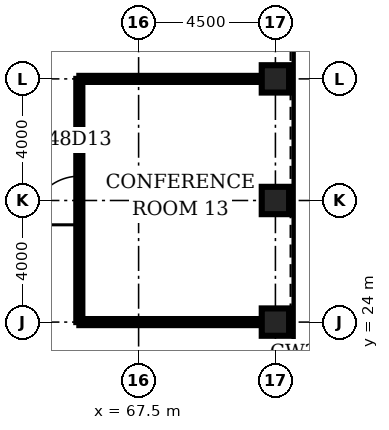
"""IFC4 building model, lengths in metres.
Left out: names, types, materials, properties, quantities, classifications, styles, units other than length and angle.
Written with IfcOpenShell. Run it as: python <this file> out.ifc"""

import sys

from ifc_helpers import new_model, si_unit, direction, frame, frame_2d, origin, origin_2d, place, context, subcontext, project, spatial, rectangle, hollow_rectangle, extrude, element, fill, save


model = new_model("IFC4")
c1 = context("Model", 3, precision=1e-05, world=origin(), true_north=direction((0.0, 1.0)))
c2 = subcontext(c1, "Body", "Model", "MODEL_VIEW")
j1 = project(units=[si_unit("LENGTHUNIT", "METRE"), si_unit("PLANEANGLEUNIT", "RADIAN")], contexts=[c1])
p1 = place(None, origin())
s1 = spatial("IfcSite", under=j1, at=p1, CompositionType="ELEMENT")
p2 = place(p1, origin())
s2 = spatial("IfcBuilding", under=s1, at=p2, CompositionType="ELEMENT")
p3 = place(p2, frame((0.0, 0.0, 215.2)))
s3 = spatial("IfcBuildingStorey", under=s2, at=p3, CompositionType="ELEMENT", Elevation=215.2)
for number, where, z_axis, x_axis in (
    (1, (72.0, 24.0, 0.0), (0.0, 0.0, 1.0), (1.0, 0.0, 0.0)),
    (2, (72.0, 28.0, 0.0), (0.0, 0.0, 1.0), (1.0, 0.0, 0.0)),
    (3, (72.0, 32.0, 0.0), (0.0, 0.0, 1.0), (1.0, 0.0, 0.0)),
):
    element("IfcColumn", number, at=place(p3, frame(where, z_axis=z_axis, x_axis=x_axis)), inside=s3, PredefinedType="COLUMN", context=c2, shape_type="SweptSolid", body=[
        extrude(hollow_rectangle(XDim=0.9, YDim=0.9, WallThickness=0.08, at=origin_2d()), origin(), (0.0, 0.0, 1.0), 4.2),
    ])
for number, where, z_axis, x_axis in (
    (4, (65.55, 24.0, 0.0), (0.0, 0.0, 1.0), (1.0, 0.0, 0.0)),
    (5, (65.55, 32.0, 0.0), (0.0, 0.0, 1.0), (1.0, 0.0, 0.0)),
):
    element("IfcWall", number, at=place(p3, frame(where, z_axis=z_axis, x_axis=x_axis)), inside=s3, PredefinedType="PARTITIONING", context=c2, shape_type="SweptSolid", body=[
        extrude(rectangle(XDim=6.0, YDim=0.2, at=frame_2d((3.0, 0.0))), origin(), (0.0, 0.0, 1.0), 3.0),
    ])
p4 = place(p3, frame((65.55, 24.0, 0.0), z_axis=(0.0, 0.0, 1.0), x_axis=(0.0, 1.0, 0.0)))
e6 = element("IfcWall", 6, at=p4, inside=s3, PredefinedType="PARTITIONING", context=c2, shape_type="SweptSolid", body=[
    extrude(rectangle(XDim=8.0, YDim=0.2, at=frame_2d((4.0, 0.0))), origin(), (0.0, 0.0, 1.0), 3.0),
])
p5 = place(p4, frame((3.2, 0.0, 0.0)))
e7 = element("IfcOpeningElement", 7, at=p5, cuts=e6, PredefinedType="OPENING", context=c2, shape_type="SweptSolid", body=[
    extrude(rectangle(XDim=1.6, YDim=2.1, at=frame_2d((0.8, 1.05))), frame((0.0, 0.11, 0.0), z_axis=(0.0, -1.0, 0.0), x_axis=(1.0, 0.0, 0.0)), (0.0, 0.0, 1.0), 0.22),
])
p6 = place(p5, origin())
e8 = element("IfcDoor", 8, at=p6, inside=s3, OperationType="SINGLE_SWING_LEFT", PredefinedType="DOOR", context=c2, shape_type="SweptSolid", body=[
    extrude(rectangle(XDim=1.6, YDim=2.1, at=frame_2d((0.8, 1.05))), frame((0.0, 0.025, 0.0), z_axis=(0.0, -1.0, 0.0), x_axis=(1.0, 0.0, 0.0)), (0.0, 0.0, 1.0), 0.05),
])
fill(e7, e8)
save(model, sys.argv[1])
